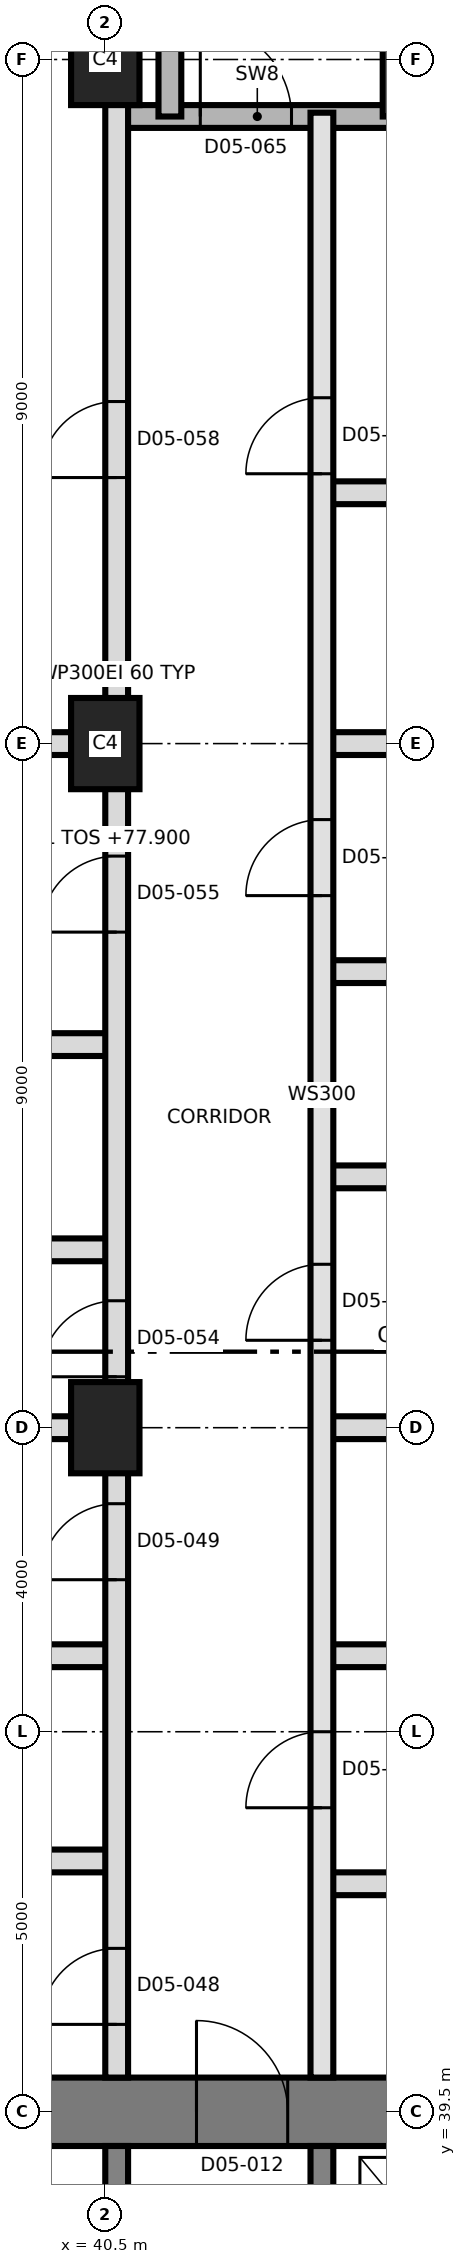
"""IFC4 building model, lengths in metres.
Left out: names, types, materials, properties, quantities, classifications, styles, units other than length and angle.
Written with IfcOpenShell. Run it as: python <this file> out.ifc"""

import sys

from ifc_helpers import new_model, si_unit, direction, frame, frame_2d, origin, origin_2d, place, context, subcontext, project, spatial, rectangle, extrude, element, fill, save


model = new_model("IFC4")
c1 = context("Model", 3, precision=1e-05, world=origin(), true_north=direction((0.0, 1.0)))
c2 = subcontext(c1, "Body", "Model", "MODEL_VIEW")
j1 = project(units=[si_unit("LENGTHUNIT", "METRE"), si_unit("PLANEANGLEUNIT", "RADIAN")], contexts=[c1])
p1 = place(None, origin())
s1 = spatial("IfcSite", under=j1, at=p1, CompositionType="ELEMENT")
p2 = place(p1, origin())
s2 = spatial("IfcBuilding", under=s1, at=p2, CompositionType="ELEMENT")
p3 = place(p2, frame((0.0, 0.0, 77.9)))
s3 = spatial("IfcBuildingStorey", under=s2, at=p3, CompositionType="ELEMENT", Elevation=77.9)
p4 = place(p3, frame((31.05, 39.5, 0.0), z_axis=(0.0, 0.0, 1.0), x_axis=(1.0, 0.0, 0.0)))
e1 = element("IfcWall", 1, at=p4, inside=s3, PredefinedType="SHEAR", context=c2, shape_type="SweptSolid", body=[
    extrude(rectangle(XDim=27.0, YDim=0.9, at=frame_2d((13.5, 0.0))), origin(), (0.0, 0.0, 1.0), 3.7),
])
p5 = place(p4, frame((10.65, 0.0, 0.0)))
e2 = element("IfcOpeningElement", 2, at=p5, cuts=e1, PredefinedType="OPENING", context=c2, shape_type="SweptSolid", body=[
    extrude(rectangle(XDim=1.2, YDim=2.1, at=frame_2d((0.6, 1.05))), frame((0.0, 0.46, 0.0), z_axis=(0.0, -1.0, 0.0), x_axis=(1.0, 0.0, 0.0)), (0.0, 0.0, 1.0), 0.92),
])
for number, where, z_axis, x_axis in (
    (3, (40.65, 33.5, 0.0), (0.0, 0.0, 1.0), (0.0, 1.0, 0.0)),
    (4, (43.35, 33.5, 0.0), (0.0, 0.0, 1.0), (0.0, 1.0, 0.0)),
):
    element("IfcWall", number, at=place(p3, frame(where, z_axis=z_axis, x_axis=x_axis)), inside=s3, PredefinedType="SHEAR", context=c2, shape_type="SweptSolid", body=[
        extrude(rectangle(XDim=5.55, YDim=0.3, at=frame_2d((2.775, 0.0))), origin(), (0.0, 0.0, 1.0), 3.7),
    ])
for number, where, z_axis, x_axis in (
    (5, (40.5, 48.5, 0.0), (0.0, 0.0, 1.0), (0.0, 1.0, 0.0)),
    (6, (40.5, 57.5, 0.0), (0.0, 0.0, 1.0), (0.0, 1.0, 0.0)),
    (7, (40.5, 66.5, 0.0), (0.0, 0.0, 1.0), (0.0, 1.0, 0.0)),
):
    element("IfcColumn", number, at=place(p3, frame(where, z_axis=z_axis, x_axis=x_axis)), inside=s3, PredefinedType="COLUMN", context=c2, shape_type="SweptSolid", body=[
        extrude(rectangle(XDim=1.2, YDim=0.9, at=origin_2d()), origin(), (0.0, 0.0, 1.0), 3.7),
    ])
p6 = place(p3, frame((43.35, 42.5, 0.0), z_axis=(0.0, 0.0, 1.0), x_axis=(1.0, 0.0, 0.0)))
e8 = element("IfcWall", 8, at=p6, inside=s3, PredefinedType="PARTITIONING", context=c2, shape_type="SweptSolid", body=[
    extrude(rectangle(XDim=3.3, YDim=0.3, at=frame_2d((1.65, 0.0))), origin(), (0.0, 0.0, 1.0), 3.4),
])
p7 = place(p3, frame((37.45, 42.8, 0.0), z_axis=(0.0, 0.0, 1.0), x_axis=(1.0, 0.0, 0.0)))
e9 = element("IfcWall", 9, at=p7, inside=s3, PredefinedType="PARTITIONING", context=c2, shape_type="SweptSolid", body=[
    extrude(rectangle(XDim=3.2, YDim=0.3, at=frame_2d((1.6, 0.0))), origin(), (0.0, 0.0, 1.0), 3.4),
])
p8 = place(p3, frame((30.35, 45.5, 0.0), z_axis=(0.0, 0.0, 1.0), x_axis=(1.0, 0.0, 0.0)))
e10 = element("IfcWall", 10, at=p8, inside=s3, PredefinedType="PARTITIONING", context=c2, shape_type="SweptSolid", body=[
    extrude(rectangle(XDim=10.3, YDim=0.3, at=frame_2d((5.15, 0.0))), origin(), (0.0, 0.0, 1.0), 3.4),
])
p9 = place(p3, frame((43.35, 45.5, 0.0), z_axis=(0.0, 0.0, 1.0), x_axis=(1.0, 0.0, 0.0)))
e11 = element("IfcWall", 11, at=p9, inside=s3, PredefinedType="PARTITIONING", context=c2, shape_type="SweptSolid", body=[
    extrude(rectangle(XDim=3.3, YDim=0.3, at=frame_2d((1.65, 0.0))), origin(), (0.0, 0.0, 1.0), 3.4),
])
p10 = place(p3, frame((30.35, 48.5, 0.0), z_axis=(0.0, 0.0, 1.0), x_axis=(1.0, 0.0, 0.0)))
e12 = element("IfcWall", 12, at=p10, inside=s3, PredefinedType="PARTITIONING", context=c2, shape_type="SweptSolid", body=[
    extrude(rectangle(XDim=10.3, YDim=0.3, at=frame_2d((5.15, 0.0))), origin(), (0.0, 0.0, 1.0), 3.4),
])
p11 = place(p3, frame((43.35, 48.5, 0.0), z_axis=(0.0, 0.0, 1.0), x_axis=(1.0, 0.0, 0.0)))
e13 = element("IfcWall", 13, at=p11, inside=s3, PredefinedType="PARTITIONING", context=c2, shape_type="SweptSolid", body=[
    extrude(rectangle(XDim=7.48, YDim=0.3, at=frame_2d((3.74, 0.0))), origin(), (0.0, 0.0, 1.0), 3.4),
])
for number, where, z_axis, x_axis in (
    (14, (37.45, 50.84, 0.0), (0.0, 0.0, 1.0), (1.0, 0.0, 0.0)),
    (15, (43.35, 51.8, 0.0), (0.0, 0.0, 1.0), (1.0, 0.0, 0.0)),
):
    element("IfcWall", number, at=place(p3, frame(where, z_axis=z_axis, x_axis=x_axis)), inside=s3, PredefinedType="PARTITIONING", context=c2, shape_type="SweptSolid", body=[
        extrude(rectangle(XDim=3.2, YDim=0.3, at=frame_2d((1.6, 0.0))), origin(), (0.0, 0.0, 1.0), 3.4),
    ])
p12 = place(p3, frame((30.35, 53.54, 0.0), z_axis=(0.0, 0.0, 1.0), x_axis=(1.0, 0.0, 0.0)))
e16 = element("IfcWall", 16, at=p12, inside=s3, PredefinedType="PARTITIONING", context=c2, shape_type="SweptSolid", body=[
    extrude(rectangle(XDim=10.3, YDim=0.3, at=frame_2d((5.15, 0.0))), origin(), (0.0, 0.0, 1.0), 3.4),
])
p13 = place(p3, frame((43.35, 54.5, 0.0), z_axis=(0.0, 0.0, 1.0), x_axis=(1.0, 0.0, 0.0)))
e17 = element("IfcWall", 17, at=p13, inside=s3, PredefinedType="PARTITIONING", context=c2, shape_type="SweptSolid", body=[
    extrude(rectangle(XDim=7.48, YDim=0.3, at=frame_2d((3.74, 0.0))), origin(), (0.0, 0.0, 1.0), 3.4),
])
p14 = place(p3, frame((30.35, 57.5, 0.0), z_axis=(0.0, 0.0, 1.0), x_axis=(1.0, 0.0, 0.0)))
e18 = element("IfcWall", 18, at=p14, inside=s3, PredefinedType="PARTITIONING", context=c2, shape_type="SweptSolid", body=[
    extrude(rectangle(XDim=10.3, YDim=0.3, at=frame_2d((5.15, 0.0))), origin(), (0.0, 0.0, 1.0), 3.4),
])
p15 = place(p3, frame((43.35, 57.5, 0.0), z_axis=(0.0, 0.0, 1.0), x_axis=(1.0, 0.0, 0.0)))
e19 = element("IfcWall", 19, at=p15, inside=s3, PredefinedType="PARTITIONING", context=c2, shape_type="SweptSolid", body=[
    extrude(rectangle(XDim=7.48, YDim=0.3, at=frame_2d((3.74, 0.0))), origin(), (0.0, 0.0, 1.0), 3.4),
])
p16 = place(p3, frame((43.35, 60.8, 0.0), z_axis=(0.0, 0.0, 1.0), x_axis=(1.0, 0.0, 0.0)))
e20 = element("IfcWall", 20, at=p16, inside=s3, PredefinedType="PARTITIONING", context=c2, shape_type="SweptSolid", body=[
    extrude(rectangle(XDim=3.5, YDim=0.3, at=frame_2d((1.75, 0.0))), origin(), (0.0, 0.0, 1.0), 3.4),
])
p17 = place(p3, frame((40.65, 65.75, 0.0), z_axis=(0.0, 0.0, 1.0), x_axis=(1.0, 0.0, 0.0)))
e21 = element("IfcWall", 21, at=p17, inside=s3, PredefinedType="SHEAR", context=c2, shape_type="SweptSolid", body=[
    extrude(rectangle(XDim=3.7, YDim=0.3, at=frame_2d((1.85, 0.0))), origin(), (0.0, 0.0, 1.0), 3.4),
])
p18 = place(p17, frame((1.1, 0.0, 0.0)))
e22 = element("IfcOpeningElement", 22, at=p18, cuts=e21, PredefinedType="OPENING", context=c2, shape_type="SweptSolid", body=[
    extrude(rectangle(XDim=1.2, YDim=2.1, at=frame_2d((0.6, 1.05))), frame((0.0, 0.16, 0.0), z_axis=(0.0, -1.0, 0.0), x_axis=(1.0, 0.0, 0.0)), (0.0, 0.0, 1.0), 0.32),
])
p19 = place(p3, frame((40.65, 39.95, 0.0), z_axis=(0.0, 0.0, 1.0), x_axis=(0.0, 1.0, 0.0)))
e23 = element("IfcWall", 23, at=p19, inside=s3, PredefinedType="PARTITIONING", context=c2, shape_type="SweptSolid", body=[
    extrude(rectangle(XDim=36.94, YDim=0.3, at=frame_2d((18.47, 0.0))), origin(), (0.0, 0.0, 1.0), 3.4),
])
p20 = place(p19, frame((0.7, 0.0, 0.0)))
e24 = element("IfcOpeningElement", 24, at=p20, cuts=e23, PredefinedType="OPENING", context=c2, shape_type="SweptSolid", body=[
    extrude(rectangle(XDim=1.0, YDim=2.1, at=frame_2d((0.5, 1.05))), frame((0.0, 0.16, 0.0), z_axis=(0.0, -1.0, 0.0), x_axis=(1.0, 0.0, 0.0)), (0.0, 0.0, 1.0), 0.32),
])
p21 = place(p19, frame((6.55, 0.0, 0.0)))
e25 = element("IfcOpeningElement", 25, at=p21, cuts=e23, PredefinedType="OPENING", context=c2, shape_type="SweptSolid", body=[
    extrude(rectangle(XDim=1.0, YDim=2.1, at=frame_2d((0.5, 1.05))), frame((0.0, 0.16, 0.0), z_axis=(0.0, -1.0, 0.0), x_axis=(1.0, 0.0, 0.0)), (0.0, 0.0, 1.0), 0.32),
])
p22 = place(p19, frame((9.22, 0.0, 0.0)))
e26 = element("IfcOpeningElement", 26, at=p22, cuts=e23, PredefinedType="OPENING", context=c2, shape_type="SweptSolid", body=[
    extrude(rectangle(XDim=1.0, YDim=2.1, at=frame_2d((0.5, 1.05))), frame((0.0, 0.16, 0.0), z_axis=(0.0, -1.0, 0.0), x_axis=(1.0, 0.0, 0.0)), (0.0, 0.0, 1.0), 0.32),
])
p23 = place(p19, frame((15.07, 0.0, 0.0)))
e27 = element("IfcOpeningElement", 27, at=p23, cuts=e23, PredefinedType="OPENING", context=c2, shape_type="SweptSolid", body=[
    extrude(rectangle(XDim=1.0, YDim=2.1, at=frame_2d((0.5, 1.05))), frame((0.0, 0.16, 0.0), z_axis=(0.0, -1.0, 0.0), x_axis=(1.0, 0.0, 0.0)), (0.0, 0.0, 1.0), 0.32),
])
p24 = place(p19, frame((21.05, 0.0, 0.0)))
e28 = element("IfcOpeningElement", 28, at=p24, cuts=e23, PredefinedType="OPENING", context=c2, shape_type="SweptSolid", body=[
    extrude(rectangle(XDim=1.0, YDim=2.4, at=frame_2d((0.5, 1.2))), frame((0.0, 0.16, 0.0), z_axis=(0.0, -1.0, 0.0), x_axis=(1.0, 0.0, 0.0)), (0.0, 0.0, 1.0), 0.32),
])
p25 = place(p3, frame((41.35, 65.75, 0.0), z_axis=(0.0, 0.0, 1.0), x_axis=(0.0, 1.0, 0.0)))
e29 = element("IfcWall", 29, at=p25, inside=s3, PredefinedType="SHEAR", context=c2, shape_type="SweptSolid", body=[
    extrude(rectangle(XDim=8.85, YDim=0.3, at=frame_2d((4.425, 0.0))), origin(), (0.0, 0.0, 1.0), 3.4),
])
p26 = place(p3, frame((43.35, 39.95, 0.0), z_axis=(0.0, 0.0, 1.0), x_axis=(0.0, 1.0, 0.0)))
e30 = element("IfcWall", 30, at=p26, inside=s3, PredefinedType="SOLIDWALL", context=c2, shape_type="SweptSolid", body=[
    extrude(rectangle(XDim=25.85, YDim=0.3, at=frame_2d((12.925, 0.0))), origin(), (0.0, 0.0, 1.0), 3.4),
])
p27 = place(p26, frame((3.55, 0.0, 0.0)))
e31 = element("IfcOpeningElement", 31, at=p27, cuts=e30, PredefinedType="OPENING", context=c2, shape_type="SweptSolid", body=[
    extrude(rectangle(XDim=1.0, YDim=2.4, at=frame_2d((0.5, 1.2))), frame((0.0, 0.16, 0.0), z_axis=(0.0, -1.0, 0.0), x_axis=(1.0, 0.0, 0.0)), (0.0, 0.0, 1.0), 0.32),
])
p28 = place(p26, frame((9.7, 0.0, 0.0)))
e32 = element("IfcOpeningElement", 32, at=p28, cuts=e30, PredefinedType="OPENING", context=c2, shape_type="SweptSolid", body=[
    extrude(rectangle(XDim=1.0, YDim=2.1, at=frame_2d((0.5, 1.05))), frame((0.0, 0.16, 0.0), z_axis=(0.0, -1.0, 0.0), x_axis=(1.0, 0.0, 0.0)), (0.0, 0.0, 1.0), 0.32),
])
p29 = place(p26, frame((15.55, 0.0, 0.0)))
e33 = element("IfcOpeningElement", 33, at=p29, cuts=e30, PredefinedType="OPENING", context=c2, shape_type="SweptSolid", body=[
    extrude(rectangle(XDim=1.0, YDim=2.1, at=frame_2d((0.5, 1.05))), frame((0.0, 0.16, 0.0), z_axis=(0.0, -1.0, 0.0), x_axis=(1.0, 0.0, 0.0)), (0.0, 0.0, 1.0), 0.32),
])
p30 = place(p26, frame((21.1, 0.0, 0.0)))
e34 = element("IfcOpeningElement", 34, at=p30, cuts=e30, PredefinedType="OPENING", context=c2, shape_type="SweptSolid", body=[
    extrude(rectangle(XDim=1.0, YDim=2.4, at=frame_2d((0.5, 1.2))), frame((0.0, 0.16, 0.0), z_axis=(0.0, -1.0, 0.0), x_axis=(1.0, 0.0, 0.0)), (0.0, 0.0, 1.0), 0.32),
])
p31 = place(p3, frame((44.3, 65.75, 0.0), z_axis=(0.0, 0.0, 1.0), x_axis=(0.0, 1.0, 0.0)))
e35 = element("IfcWall", 35, at=p31, inside=s3, PredefinedType="SHEAR", context=c2, shape_type="SweptSolid", body=[
    extrude(rectangle(XDim=8.85, YDim=0.3, at=frame_2d((4.425, 0.0))), origin(), (0.0, 0.0, 1.0), 3.4),
])
p32 = place(p5, origin())
e36 = element("IfcDoor", 36, at=p32, inside=s3, OperationType="SINGLE_SWING_RIGHT", PredefinedType="DOOR", context=c2, shape_type="SweptSolid", body=[
    extrude(rectangle(XDim=1.2, YDim=2.1, at=frame_2d((0.6, 1.05))), frame((0.0, 0.025, 0.0), z_axis=(0.0, -1.0, 0.0), x_axis=(1.0, 0.0, 0.0)), (0.0, 0.0, 1.0), 0.05),
])
fill(e2, e36)
p33 = place(p27, origin())
e37 = element("IfcDoor", 37, at=p33, inside=s3, OperationType="SINGLE_SWING_LEFT", PredefinedType="DOOR", context=c2, shape_type="SweptSolid", body=[
    extrude(rectangle(XDim=1.0, YDim=2.4, at=frame_2d((0.5, 1.2))), frame((0.0, 0.025, 0.0), z_axis=(0.0, -1.0, 0.0), x_axis=(1.0, 0.0, 0.0)), (0.0, 0.0, 1.0), 0.05),
])
fill(e31, e37)
p34 = place(p20, origin())
e38 = element("IfcDoor", 38, at=p34, inside=s3, OperationType="SINGLE_SWING_LEFT", PredefinedType="DOOR", context=c2, shape_type="SweptSolid", body=[
    extrude(rectangle(XDim=1.0, YDim=2.1, at=frame_2d((0.5, 1.05))), frame((0.0, 0.025, 0.0), z_axis=(0.0, -1.0, 0.0), x_axis=(1.0, 0.0, 0.0)), (0.0, 0.0, 1.0), 0.05),
])
fill(e24, e38)
p35 = place(p21, origin())
e39 = element("IfcDoor", 39, at=p35, inside=s3, OperationType="SINGLE_SWING_RIGHT", PredefinedType="DOOR", context=c2, shape_type="SweptSolid", body=[
    extrude(rectangle(XDim=1.0, YDim=2.1, at=frame_2d((0.5, 1.05))), frame((0.0, 0.025, 0.0), z_axis=(0.0, -1.0, 0.0), x_axis=(1.0, 0.0, 0.0)), (0.0, 0.0, 1.0), 0.05),
])
fill(e25, e39)
p36 = place(p28, origin())
e40 = element("IfcDoor", 40, at=p36, inside=s3, OperationType="SINGLE_SWING_LEFT", PredefinedType="DOOR", context=c2, shape_type="SweptSolid", body=[
    extrude(rectangle(XDim=1.0, YDim=2.1, at=frame_2d((0.5, 1.05))), frame((0.0, 0.025, 0.0), z_axis=(0.0, -1.0, 0.0), x_axis=(1.0, 0.0, 0.0)), (0.0, 0.0, 1.0), 0.05),
])
fill(e32, e40)
p37 = place(p29, origin())
e41 = element("IfcDoor", 41, at=p37, inside=s3, OperationType="SINGLE_SWING_RIGHT", PredefinedType="DOOR", context=c2, shape_type="SweptSolid", body=[
    extrude(rectangle(XDim=1.0, YDim=2.1, at=frame_2d((0.5, 1.05))), frame((0.0, 0.025, 0.0), z_axis=(0.0, -1.0, 0.0), x_axis=(1.0, 0.0, 0.0)), (0.0, 0.0, 1.0), 0.05),
])
fill(e33, e41)
p38 = place(p22, origin())
e42 = element("IfcDoor", 42, at=p38, inside=s3, OperationType="SINGLE_SWING_LEFT", PredefinedType="DOOR", context=c2, shape_type="SweptSolid", body=[
    extrude(rectangle(XDim=1.0, YDim=2.1, at=frame_2d((0.5, 1.05))), frame((0.0, 0.025, 0.0), z_axis=(0.0, -1.0, 0.0), x_axis=(1.0, 0.0, 0.0)), (0.0, 0.0, 1.0), 0.05),
])
fill(e26, e42)
p39 = place(p23, origin())
e43 = element("IfcDoor", 43, at=p39, inside=s3, OperationType="SINGLE_SWING_RIGHT", PredefinedType="DOOR", context=c2, shape_type="SweptSolid", body=[
    extrude(rectangle(XDim=1.0, YDim=2.1, at=frame_2d((0.5, 1.05))), frame((0.0, 0.025, 0.0), z_axis=(0.0, -1.0, 0.0), x_axis=(1.0, 0.0, 0.0)), (0.0, 0.0, 1.0), 0.05),
])
fill(e27, e43)
p40 = place(p30, origin())
e44 = element("IfcDoor", 44, at=p40, inside=s3, OperationType="SINGLE_SWING_LEFT", PredefinedType="DOOR", context=c2, shape_type="SweptSolid", body=[
    extrude(rectangle(XDim=1.0, YDim=2.4, at=frame_2d((0.5, 1.2))), frame((0.0, 0.025, 0.0), z_axis=(0.0, -1.0, 0.0), x_axis=(1.0, 0.0, 0.0)), (0.0, 0.0, 1.0), 0.05),
])
fill(e34, e44)
p41 = place(p24, origin())
e45 = element("IfcDoor", 45, at=p41, inside=s3, OperationType="SINGLE_SWING_RIGHT", PredefinedType="DOOR", context=c2, shape_type="SweptSolid", body=[
    extrude(rectangle(XDim=1.0, YDim=2.4, at=frame_2d((0.5, 1.2))), frame((0.0, 0.025, 0.0), z_axis=(0.0, -1.0, 0.0), x_axis=(1.0, 0.0, 0.0)), (0.0, 0.0, 1.0), 0.05),
])
fill(e28, e45)
p42 = place(p18, origin())
e46 = element("IfcDoor", 46, at=p42, inside=s3, OperationType="SINGLE_SWING_RIGHT", PredefinedType="DOOR", context=c2, shape_type="SweptSolid", body=[
    extrude(rectangle(XDim=1.2, YDim=2.1, at=frame_2d((0.6, 1.05))), frame((0.0, 0.025, 0.0), z_axis=(0.0, -1.0, 0.0), x_axis=(1.0, 0.0, 0.0)), (0.0, 0.0, 1.0), 0.05),
])
fill(e22, e46)
save(model, sys.argv[1])
